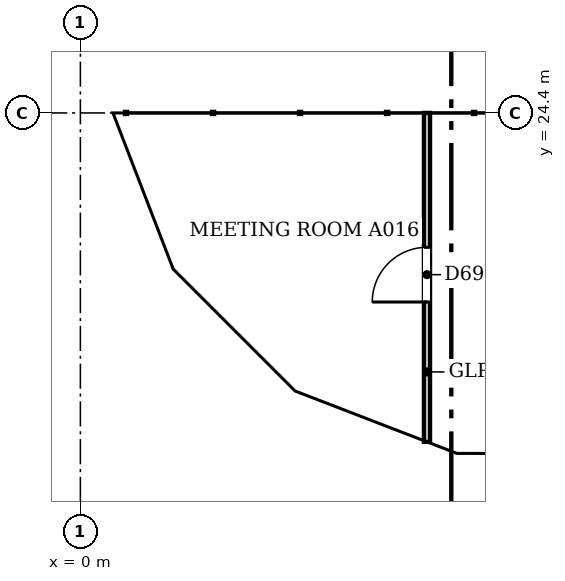
"""IFC4 building model, lengths in metres.
Left out: names, types, materials, properties, quantities, classifications, styles, units other than length and angle.
Written with IfcOpenShell. Run it as: python <this file> out.ifc"""

import sys

from ifc_helpers import new_model, si_unit, direction, frame, frame_2d, origin, place, context, subcontext, project, spatial, polyline, rectangle, outline, extrude, faceted_brep, source, transform, mapped, element, fill, save


model = new_model("IFC4")
c1 = context("Model", 3, precision=1e-05, world=origin(), true_north=direction((0.0, 1.0)))
c2 = subcontext(c1, "Body", "Model", "MODEL_VIEW")
j1 = project(units=[si_unit("LENGTHUNIT", "METRE"), si_unit("PLANEANGLEUNIT", "RADIAN")], contexts=[c1])
p1 = place(None, origin())
s1 = spatial("IfcSite", under=j1, at=p1, CompositionType="ELEMENT")
p2 = place(p1, origin())
s2 = spatial("IfcBuilding", under=s1, at=p2, CompositionType="ELEMENT")
p3 = place(p2, frame((0.0, 0.0, 72.4)))
s3 = spatial("IfcBuildingStorey", under=s2, at=p3, CompositionType="ELEMENT", Elevation=72.4)
m1 = source(origin(), c2, "Body", "Brep", [
    faceted_brep([(3.003, -0.25, 0.0), (3.05, -0.25, 0.06), (3.05, -0.25, 7.54), (3.003, -0.25, 7.6), (0.0, -0.25, 3.8), (0.0, 0.25, 3.8), (2.957, 0.25, 7.541), (2.957, 0.25, 0.059), (3.003, 0.0, 0.0), (3.003, 0.0, 7.6)], [[[0, 1, 2, 3, 4]], [[5, 6, 7]], [[1, 0, 8]], [[9, 3, 2]], [[6, 5, 4, 3, 9]], [[5, 7, 8, 0, 4]], [[1, 8, 7, 6, 9, 2]]]),
])
p4 = place(p3, frame((0.25, 27.45, -3.8), z_axis=(0.0, 0.0, 1.0), x_axis=(0.0, -1.0, 0.0)))
e1 = element("IfcWall", 1, at=p4, inside=s3, PredefinedType="SOLIDWALL", context=c2, shape_type="MappedRepresentation", body=[
    mapped(m1, transform((0.0, 0.0, 0.0), scale=1.0)),
])
m2 = source(origin(), c2, "Body", "SweptSolid", [
    extrude(outline(polyline([(2.803, 6.944), (0.319, 3.8), (2.803, 0.656), (2.803, 6.944)])), frame((0.0, 0.26, 0.0), z_axis=(0.0, -1.0, 0.0), x_axis=(1.0, 0.0, 0.0)), (0.0, 0.0, 1.0), 0.52),
])
p5 = place(p4, origin())
e2 = element("IfcOpeningElement", 2, at=p5, cuts=e1, PredefinedType="OPENING", context=c2, shape_type="MappedRepresentation", body=[
    mapped(m2, transform((0.0, 0.0, 0.0), scale=1.0)),
])
m3 = source(origin(), c2, "Body", "Brep", [
    faceted_brep([(0.047, -0.25, 0.0), (2.997, -0.25, 3.8), (0.047, -0.25, 7.6), (0.0, -0.25, 7.541), (0.0, -0.25, 0.059), (0.093, 0.25, 7.54), (2.944, 0.25, 3.868), (2.944, 0.25, 3.732), (0.093, 0.25, 0.06), (2.997, 0.0, 3.8), (0.047, 0.0, 0.0), (0.047, 0.0, 7.6)], [[[0, 1, 2, 3, 4]], [[5, 6, 7, 8]], [[8, 7, 9, 1, 0, 10]], [[6, 5, 11, 2, 1, 9]], [[3, 2, 11]], [[10, 0, 4]], [[8, 10, 4, 3, 11, 5]], [[9, 7, 6]]]),
])
p6 = place(p3, frame((0.233, 24.49, -3.8), z_axis=(0.0, 0.0, 1.0), x_axis=(0.359901446078, -0.932990326376, 0.0)))
e3 = element("IfcWall", 3, at=p6, inside=s3, PredefinedType="SOLIDWALL", context=c2, shape_type="MappedRepresentation", body=[
    mapped(m3, transform((0.0, 0.0, 0.0), scale=1.0)),
])
m4 = source(origin(), c2, "Body", "SweptSolid", [
    extrude(outline(polyline([(0.247, 0.665), (2.681, 3.8), (0.247, 6.935), (0.247, 0.665)])), frame((0.0, 0.26, 0.0), z_axis=(0.0, -1.0, 0.0), x_axis=(1.0, 0.0, 0.0)), (0.0, 0.0, 1.0), 0.52),
])
p7 = place(p6, origin())
e4 = element("IfcOpeningElement", 4, at=p7, cuts=e3, PredefinedType="OPENING", context=c2, shape_type="MappedRepresentation", body=[
    mapped(m4, transform((0.0, 0.0, 0.0), scale=1.0)),
])
m5 = source(origin(), c2, "Body", "Brep", [
    faceted_brep([(2.944, -0.25, 0.0), (2.997, -0.25, 0.068), (2.997, -0.25, 7.532), (2.944, -0.25, 7.6), (0.0, -0.25, 3.8), (0.053, 0.25, 3.868), (2.891, 0.25, 7.532), (2.891, 0.25, 0.068), (0.053, 0.25, 3.731), (2.944, 0.0, 0.0), (2.944, 0.0, 7.6), (0.0, 0.0, 3.8)], [[[0, 1, 2, 3, 4]], [[5, 6, 7, 8]], [[1, 0, 9]], [[10, 3, 2]], [[6, 5, 11, 4, 3, 10]], [[8, 7, 9, 0, 4, 11]], [[8, 11, 5]], [[1, 9, 7, 6, 10, 2]]]),
])
p8 = place(p3, frame((1.312, 21.694, -3.8), z_axis=(0.0, 0.0, 1.0), x_axis=(0.707066050402, -0.707147509625, 0.0)))
e5 = element("IfcWall", 5, at=p8, inside=s3, PredefinedType="SOLIDWALL", context=c2, shape_type="MappedRepresentation", body=[
    mapped(m5, transform((0.0, 0.0, 0.0), scale=1.0)),
])
m6 = source(origin(), c2, "Body", "SweptSolid", [
    extrude(outline(polyline([(2.744, 6.934), (0.316, 3.8), (2.744, 0.666), (2.744, 6.934)])), frame((0.0, 0.26, 0.0), z_axis=(0.0, -1.0, 0.0), x_axis=(1.0, 0.0, 0.0)), (0.0, 0.0, 1.0), 0.52),
])
p9 = place(p8, origin())
e6 = element("IfcOpeningElement", 6, at=p9, cuts=e5, PredefinedType="OPENING", context=c2, shape_type="MappedRepresentation", body=[
    mapped(m6, transform((0.0, 0.0, 0.0), scale=1.0)),
])
m7 = source(origin(), c2, "Body", "Brep", [
    faceted_brep([(0.053, -0.25, 0.0), (3.003, -0.25, 3.8), (0.053, -0.25, 7.6), (0.0, -0.25, 7.531), (0.0, -0.25, 0.068), (0.106, 0.25, 7.532), (2.957, 0.25, 3.86), (2.957, 0.25, 3.74), (0.106, 0.25, 0.068), (3.003, 0.0, 3.8), (0.053, 0.0, 0.0), (0.053, 0.0, 7.6)], [[[0, 1, 2, 3, 4]], [[5, 6, 7, 8]], [[8, 7, 9, 1, 0, 10]], [[6, 5, 11, 2, 1, 9]], [[3, 2, 11]], [[10, 0, 4]], [[8, 10, 4, 3, 11, 5]], [[9, 7, 6]]]),
])
p10 = place(p3, frame((3.344, 19.631, -3.8), z_axis=(0.0, 0.0, 1.0), x_axis=(0.933007896601, -0.359855894603, 0.0)))
e7 = element("IfcWall", 7, at=p10, inside=s3, PredefinedType="SOLIDWALL", context=c2, shape_type="MappedRepresentation", body=[
    mapped(m7, transform((0.0, 0.0, 0.0), scale=1.0)),
])
m8 = source(origin(), c2, "Body", "SweptSolid", [
    extrude(outline(polyline([(0.253, 0.665), (2.687, 3.8), (0.253, 6.935), (0.253, 0.665)])), frame((0.0, 0.26, 0.0), z_axis=(0.0, -1.0, 0.0), x_axis=(1.0, 0.0, 0.0)), (0.0, 0.0, 1.0), 0.52),
])
p11 = place(p10, origin())
e8 = element("IfcOpeningElement", 8, at=p11, cuts=e7, PredefinedType="OPENING", context=c2, shape_type="MappedRepresentation", body=[
    mapped(m8, transform((0.0, 0.0, 0.0), scale=1.0)),
])
m9 = source(origin(), c2, "Body", "Brep", [
    faceted_brep([(3.003, -0.25, 0.0), (6.053, -0.25, 3.8), (3.003, -0.25, 7.6), (0.0, -0.25, 3.8), (0.047, 0.25, 3.859), (3.003, 0.25, 7.6), (6.053, 0.25, 3.8), (3.003, 0.25, 0.0), (0.047, 0.25, 3.741), (0.0, 0.0, 3.8)], [[[0, 1, 2, 3]], [[4, 5, 6, 7, 8]], [[7, 6, 1, 0]], [[6, 5, 2, 1]], [[5, 4, 9, 3, 2]], [[8, 7, 0, 3, 9]], [[8, 9, 4]]]),
])
p12 = place(p3, frame((6.146, 18.55, -3.8), z_axis=(0.0, 0.0, 1.0), x_axis=(1.0, 0.0, 0.0)))
e9 = element("IfcWall", 9, at=p12, inside=s3, PredefinedType="SOLIDWALL", context=c2, shape_type="MappedRepresentation", body=[
    mapped(m9, transform((0.0, 0.0, 0.0), scale=1.0)),
])
m10 = source(origin(), c2, "Body", "SweptSolid", [
    extrude(outline(polyline([(3.005, 0.401), (5.733, 3.8), (3.005, 7.199), (0.319, 3.8), (3.005, 0.401)])), frame((0.0, 0.26, 0.0), z_axis=(0.0, -1.0, 0.0), x_axis=(1.0, 0.0, 0.0)), (0.0, 0.0, 1.0), 0.52),
])
p13 = place(p12, origin())
e10 = element("IfcOpeningElement", 10, at=p13, cuts=e9, PredefinedType="OPENING", context=c2, shape_type="MappedRepresentation", body=[
    mapped(m10, transform((0.0, 0.0, 0.0), scale=1.0)),
])
p14 = place(p2, frame((0.0, 0.0, 76.2)))
s4 = spatial("IfcBuildingStorey", under=s2, at=p14, CompositionType="ELEMENT", Elevation=76.2)
m11 = source(origin(), c2, "Body", "Brep", [
    faceted_brep([(3.05, -0.25, 0.0), (6.053, -0.25, 3.8), (3.05, -0.25, 7.6), (0.0, -0.25, 3.8), (0.0, 0.25, 3.8), (3.05, 0.25, 7.6), (6.007, 0.25, 3.859), (6.007, 0.25, 3.741), (3.05, 0.25, 0.0), (6.053, 0.0, 3.8)], [[[0, 1, 2, 3]], [[4, 5, 6, 7, 8]], [[8, 7, 9, 1, 0]], [[6, 5, 2, 1, 9]], [[5, 4, 3, 2]], [[4, 8, 0, 3]], [[9, 7, 6]]]),
])
p15 = place(p14, frame((0.25, 30.5, -3.8), z_axis=(0.0, 0.0, 1.0), x_axis=(0.0, -1.0, 0.0)))
e11 = element("IfcWall", 11, at=p15, inside=s4, PredefinedType="SOLIDWALL", context=c2, shape_type="MappedRepresentation", body=[
    mapped(m11, transform((0.0, 0.0, 0.0), scale=1.0)),
])
m12 = source(origin(), c2, "Body", "SweptSolid", [
    extrude(outline(polyline([(3.049, 0.401), (5.735, 3.8), (3.049, 7.199), (0.321, 3.8), (3.049, 0.401)])), frame((0.0, 0.26, 0.0), z_axis=(0.0, -1.0, 0.0), x_axis=(1.0, 0.0, 0.0)), (0.0, 0.0, 1.0), 0.52),
])
p16 = place(p15, origin())
e12 = element("IfcOpeningElement", 12, at=p16, cuts=e11, PredefinedType="OPENING", context=c2, shape_type="MappedRepresentation", body=[
    mapped(m12, transform((0.0, 0.0, 0.0), scale=1.0)),
])
m13 = source(origin(), c2, "Body", "Brep", [
    faceted_brep([(2.95, -0.25, 0.0), (3.003, -0.25, 0.068), (3.003, -0.25, 7.532), (2.95, -0.25, 7.6), (0.0, -0.25, 3.8), (0.047, 0.25, 3.86), (2.898, 0.25, 7.532), (2.898, 0.25, 0.068), (0.047, 0.25, 3.74), (2.95, 0.0, 0.0), (2.95, 0.0, 7.6), (0.0, 0.0, 3.8)], [[[0, 1, 2, 3, 4]], [[5, 6, 7, 8]], [[1, 0, 9]], [[10, 3, 2]], [[6, 5, 11, 4, 3, 10]], [[8, 7, 9, 0, 4, 11]], [[8, 11, 5]], [[1, 9, 7, 6, 10, 2]]]),
])
p17 = place(p14, frame((0.25, 24.447, -3.8), z_axis=(0.0, 0.0, 1.0), x_axis=(0.35992665181, -0.932980602862, 0.0)))
e13 = element("IfcWall", 13, at=p17, inside=s4, PredefinedType="SOLIDWALL", context=c2, shape_type="MappedRepresentation", body=[
    mapped(m13, transform((0.0, 0.0, 0.0), scale=1.0)),
])
m14 = source(origin(), c2, "Body", "SweptSolid", [
    extrude(outline(polyline([(2.75, 6.935), (0.316, 3.8), (2.75, 0.665), (2.75, 6.935)])), frame((0.0, 0.26, 0.0), z_axis=(0.0, -1.0, 0.0), x_axis=(1.0, 0.0, 0.0)), (0.0, 0.0, 1.0), 0.52),
])
p18 = place(p17, origin())
e14 = element("IfcOpeningElement", 14, at=p18, cuts=e13, PredefinedType="OPENING", context=c2, shape_type="MappedRepresentation", body=[
    mapped(m14, transform((0.0, 0.0, 0.0), scale=1.0)),
])
m15 = source(origin(), c2, "Body", "Brep", [
    faceted_brep([(0.053, -0.25, 0.0), (2.997, -0.25, 3.8), (0.053, -0.25, 7.6), (0.0, -0.25, 7.532), (0.0, -0.25, 0.068), (0.106, 0.25, 7.532), (2.944, 0.25, 3.868), (2.944, 0.25, 3.732), (0.106, 0.25, 0.068), (2.997, 0.0, 3.8), (0.053, 0.0, 0.0), (0.053, 0.0, 7.6)], [[[0, 1, 2, 3, 4]], [[5, 6, 7, 8]], [[8, 7, 9, 1, 0, 10]], [[6, 5, 11, 2, 1, 9]], [[3, 2, 11]], [[10, 0, 4]], [[8, 10, 4, 3, 11, 5]], [[9, 7, 6]]]),
])
p19 = place(p14, frame((1.274, 21.731, -3.8), z_axis=(0.0, 0.0, 1.0), x_axis=(0.707147509625, -0.707066050402, 0.0)))
e15 = element("IfcWall", 15, at=p19, inside=s4, PredefinedType="SOLIDWALL", context=c2, shape_type="MappedRepresentation", body=[
    mapped(m15, transform((0.0, 0.0, 0.0), scale=1.0)),
])
m16 = source(origin(), c2, "Body", "SweptSolid", [
    extrude(outline(polyline([(0.253, 0.667), (2.681, 3.8), (0.253, 6.934), (0.253, 0.667)])), frame((0.0, 0.26, 0.0), z_axis=(0.0, -1.0, 0.0), x_axis=(1.0, 0.0, 0.0)), (0.0, 0.0, 1.0), 0.52),
])
p20 = place(p19, origin())
e16 = element("IfcOpeningElement", 16, at=p20, cuts=e15, PredefinedType="OPENING", context=c2, shape_type="MappedRepresentation", body=[
    mapped(m16, transform((0.0, 0.0, 0.0), scale=1.0)),
])
m17 = source(origin(), c2, "Body", "Brep", [
    faceted_brep([(2.95, -0.25, 0.0), (2.997, -0.25, 0.059), (2.997, -0.25, 7.541), (2.95, -0.25, 7.6), (0.0, -0.25, 3.8), (0.053, 0.25, 3.868), (2.904, 0.25, 7.54), (2.904, 0.25, 0.06), (0.053, 0.25, 3.732), (2.95, 0.0, 0.0), (2.95, 0.0, 7.6), (0.0, 0.0, 3.8)], [[[0, 1, 2, 3, 4]], [[5, 6, 7, 8]], [[1, 0, 9]], [[10, 3, 2]], [[6, 5, 11, 4, 3, 10]], [[8, 7, 9, 0, 4, 11]], [[8, 11, 5]], [[1, 9, 7, 6, 10, 2]]]),
])
p21 = place(p14, frame((3.394, 19.612, -3.8), z_axis=(0.0, 0.0, 1.0), x_axis=(0.932990326376, -0.359901446078, 0.0)))
e17 = element("IfcWall", 17, at=p21, inside=s4, PredefinedType="SOLIDWALL", context=c2, shape_type="MappedRepresentation", body=[
    mapped(m17, transform((0.0, 0.0, 0.0), scale=1.0)),
])
p22 = place(p21, origin())
e18 = element("IfcOpeningElement", 18, at=p22, cuts=e17, PredefinedType="OPENING", context=c2, shape_type="MappedRepresentation", body=[
    mapped(m14, transform((0.0, 0.0, 0.0), scale=1.0)),
])
m18 = source(origin(), c2, "Body", "Brep", [
    faceted_brep([(0.047, -0.25, 0.0), (3.05, -0.25, 3.8), (0.047, -0.25, 7.6), (0.0, -0.25, 7.54), (0.0, -0.25, 0.06), (0.093, 0.25, 7.541), (3.05, 0.25, 3.8), (0.093, 0.25, 0.059), (0.047, 0.0, 0.0), (0.047, 0.0, 7.6)], [[[0, 1, 2, 3, 4]], [[5, 6, 7]], [[7, 6, 1, 0, 8]], [[6, 5, 9, 2, 1]], [[3, 2, 9]], [[8, 0, 4]], [[7, 8, 4, 3, 9, 5]]]),
])
p23 = place(p14, frame((6.1, 18.55, -3.8), z_axis=(0.0, 0.0, 1.0), x_axis=(1.0, 0.0, 0.0)))
e19 = element("IfcWall", 19, at=p23, inside=s4, PredefinedType="SOLIDWALL", context=c2, shape_type="MappedRepresentation", body=[
    mapped(m18, transform((0.0, 0.0, 0.0), scale=1.0)),
])
m19 = source(origin(), c2, "Body", "SweptSolid", [
    extrude(outline(polyline([(0.247, 0.656), (2.731, 3.8), (0.247, 6.944), (0.247, 0.656)])), frame((0.0, 0.26, 0.0), z_axis=(0.0, -1.0, 0.0), x_axis=(1.0, 0.0, 0.0)), (0.0, 0.0, 1.0), 0.52),
])
p24 = place(p23, origin())
e20 = element("IfcOpeningElement", 20, at=p24, cuts=e19, PredefinedType="OPENING", context=c2, shape_type="MappedRepresentation", body=[
    mapped(m19, transform((0.0, 0.0, 0.0), scale=1.0)),
])
p25 = place(p3, frame((5.7, 18.99, 0.0), z_axis=(0.0, 0.0, 1.0), x_axis=(0.0, 1.0, 0.0)))
e21 = element("IfcWall", 21, at=p25, inside=s3, PredefinedType="PARTITIONING", context=c2, shape_type="SweptSolid", body=[
    extrude(rectangle(XDim=5.41, YDim=0.1, at=frame_2d((2.705, 0.0))), origin(), (0.0, 0.0, 1.0), 3.067),
])
m20 = source(origin(), c2, "Body", "SweptSolid", [
    extrude(rectangle(XDim=0.9, YDim=2.1, at=frame_2d((0.45, 1.05))), frame((0.0, 0.06, 0.0), z_axis=(0.0, -1.0, 0.0), x_axis=(1.0, 0.0, 0.0)), (0.0, 0.0, 1.0), 0.12),
])
p26 = place(p25, frame((2.3, 0.0, 0.0)))
e22 = element("IfcOpeningElement", 22, at=p26, cuts=e21, PredefinedType="OPENING", context=c2, shape_type="MappedRepresentation", body=[
    mapped(m20, transform((0.0, 0.0, 0.0), scale=1.0)),
])
m21 = source(origin(), c2, "Body", "SweptSolid", [
    extrude(rectangle(XDim=0.9, YDim=2.1, at=frame_2d((0.45, 1.05))), frame((0.0, 0.025, 0.0), z_axis=(0.0, -1.0, 0.0), x_axis=(1.0, 0.0, 0.0)), (0.0, 0.0, 1.0), 0.05),
])
p27 = place(p26, origin())
e23 = element("IfcDoor", 23, at=p27, inside=s3, OperationType="SINGLE_SWING_LEFT", PredefinedType="DOOR", context=c2, shape_type="MappedRepresentation", body=[
    mapped(m21, transform((0.0, 0.0, 0.0), scale=1.0)),
])
fill(e22, e23)
save(model, sys.argv[1])
